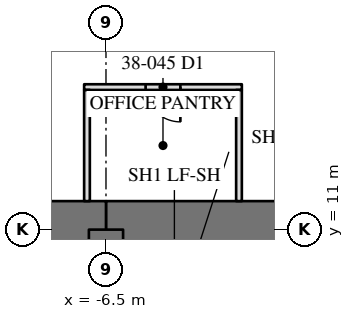
"""IFC4 building model, lengths in metres.
Left out: names, types, materials, properties, quantities, classifications, styles, units other than length and angle.
Written with IfcOpenShell. Run it as: python <this file> out.ifc"""

import sys

from ifc_helpers import new_model, si_unit, direction, frame, frame_2d, origin, place, context, subcontext, project, spatial, rectangle, extrude, element, fill, save


model = new_model("IFC4")
c1 = context("Model", 3, precision=1e-05, world=origin(), true_north=direction((0.0, 1.0)))
c2 = subcontext(c1, "Body", "Model", "MODEL_VIEW")
j1 = project(units=[si_unit("LENGTHUNIT", "METRE"), si_unit("PLANEANGLEUNIT", "RADIAN")], contexts=[c1])
p1 = place(None, origin())
s1 = spatial("IfcSite", under=j1, at=p1, CompositionType="ELEMENT")
p2 = place(p1, origin())
s2 = spatial("IfcBuilding", under=s1, at=p2, CompositionType="ELEMENT")
p3 = place(p2, frame((0.0, 0.0, 162.3)))
s3 = spatial("IfcBuildingStorey", under=s2, at=p3, CompositionType="ELEMENT", Elevation=162.3)
p4 = place(p3, frame((6.5, 11.0, 0.0), z_axis=(0.0, 0.0, 1.0), x_axis=(-1.0, 0.0, 0.0)))
e1 = element("IfcWall", 1, at=p4, inside=s3, PredefinedType="SHEAR", context=c2, shape_type="SweptSolid", body=[
    extrude(rectangle(XDim=13.0, YDim=1.5, at=frame_2d((6.5, 0.0))), origin(), (0.0, 0.0, 1.0), 4.1),
])
p5 = place(p3, frame((-6.5, 11.0, 0.0), z_axis=(0.0, 0.0, 1.0), x_axis=(-1.0, 0.0, 0.0)))
e2 = element("IfcWall", 2, at=p5, inside=s3, PredefinedType="SHEAR", context=c2, shape_type="SweptSolid", body=[
    extrude(rectangle(XDim=4.5, YDim=1.5, at=frame_2d((2.25, 0.0))), origin(), (0.0, 0.0, 1.0), 4.1),
])
p6 = place(p3, frame((-6.5, 11.0, 0.0), z_axis=(0.0, 0.0, 1.0), x_axis=(0.0, -1.0, 0.0)))
e3 = element("IfcWall", 3, at=p6, inside=s3, PredefinedType="SHEAR", context=c2, shape_type="SweptSolid", body=[
    extrude(rectangle(XDim=4.5, YDim=0.9, at=frame_2d((2.25, 0.0))), origin(), (0.0, 0.0, 1.0), 4.1),
])
p7 = place(p3, frame((-2.925, 14.75, 0.0), z_axis=(0.0, 0.0, 1.0), x_axis=(-1.0, 0.0, 0.0)))
e4 = element("IfcWall", 4, at=p7, inside=s3, PredefinedType="PARTITIONING", context=c2, shape_type="SweptSolid", body=[
    extrude(rectangle(XDim=4.15, YDim=0.15, at=frame_2d((2.075, 0.0))), origin(), (0.0, 0.0, 1.0), 3.91),
])
p8 = place(p7, frame((1.617, 0.0, 0.0)))
e5 = element("IfcOpeningElement", 5, at=p8, cuts=e4, PredefinedType="OPENING", context=c2, shape_type="SweptSolid", body=[
    extrude(rectangle(XDim=0.915, YDim=2.134, at=frame_2d((0.458, 1.067))), frame((0.0, 0.085, 0.0), z_axis=(0.0, -1.0, 0.0), x_axis=(1.0, 0.0, 0.0)), (0.0, 0.0, 1.0), 0.17),
])
for number, where, z_axis, x_axis in (
    (6, (-3.0, 14.675, 0.0), (0.0, 0.0, 1.0), (0.0, -1.0, 0.0)),
    (7, (-7.0, 14.675, 0.0), (0.0, 0.0, 1.0), (0.0, -1.0, 0.0)),
):
    element("IfcWall", number, at=place(p3, frame(where, z_axis=z_axis, x_axis=x_axis)), inside=s3, PredefinedType="PARTITIONING", context=c2, shape_type="SweptSolid", body=[
        extrude(rectangle(XDim=2.925, YDim=0.15, at=frame_2d((1.462, 0.0))), origin(), (0.0, 0.0, 1.0), 3.91),
    ])
p9 = place(p8, origin())
e8 = element("IfcDoor", 8, at=p9, inside=s3, OperationType="SINGLE_SWING_LEFT", PredefinedType="DOOR", context=c2, shape_type="SweptSolid", body=[
    extrude(rectangle(XDim=0.915, YDim=2.134, at=frame_2d((0.458, 1.067))), frame((0.0, 0.025, 0.0), z_axis=(0.0, -1.0, 0.0), x_axis=(1.0, 0.0, 0.0)), (0.0, 0.0, 1.0), 0.05),
])
fill(e5, e8)
save(model, sys.argv[1])
